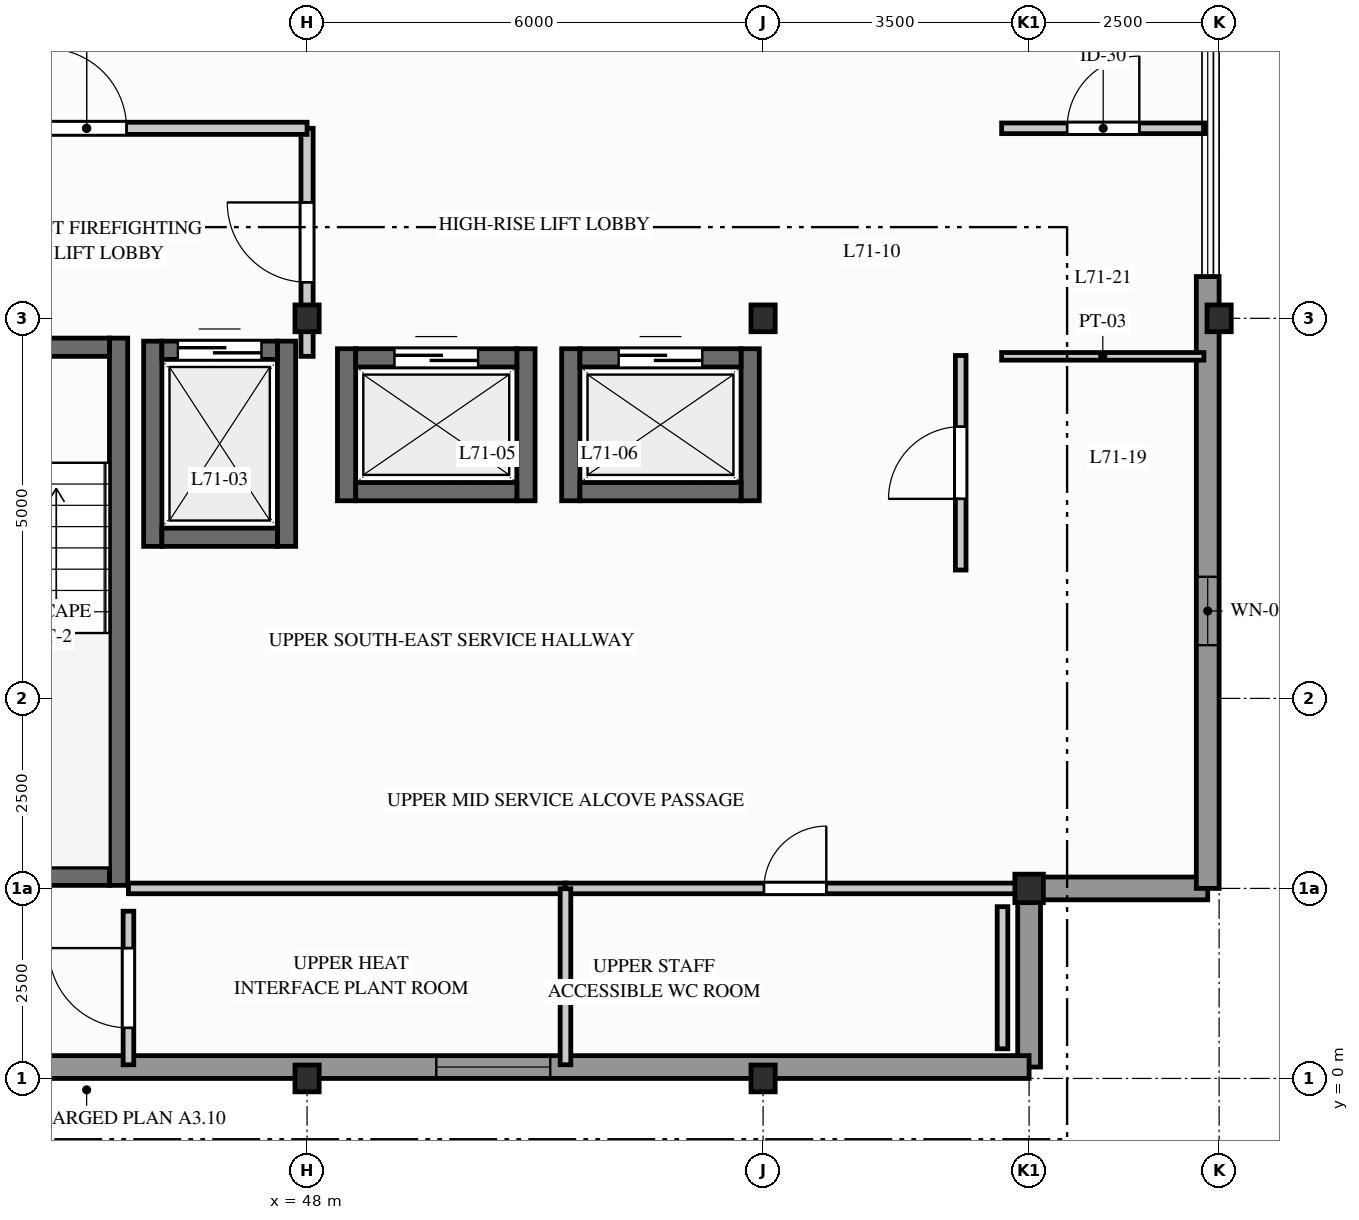
"""IFC4 building model, lengths in metres.
Left out: names, types, materials, properties, quantities, classifications, styles, units other than length and angle.
Written with IfcOpenShell. Run it as: python <this file> out.ifc"""

import sys

from ifc_helpers import new_model, si_unit, direction, frame, frame_2d, origin, origin_2d, place, context, subcontext, project, spatial, rectangle, i_section, extrude, element, fill, save


model = new_model("IFC4")
c1 = context("Model", 3, precision=1e-05, world=origin(), true_north=direction((0.0, 1.0)))
c2 = subcontext(c1, "Body", "Model", "MODEL_VIEW")
j1 = project(units=[si_unit("LENGTHUNIT", "METRE"), si_unit("PLANEANGLEUNIT", "RADIAN")], contexts=[c1])
p1 = place(None, origin())
s1 = spatial("IfcSite", under=j1, at=p1, CompositionType="ELEMENT")
p2 = place(p1, origin())
s2 = spatial("IfcBuilding", under=s1, at=p2, CompositionType="ELEMENT")
p3 = place(p2, frame((0.0, 0.0, 233.5)))
s3 = spatial("IfcBuildingStorey", under=s2, at=p3, CompositionType="ELEMENT", Elevation=233.5)
for number, where, z_axis, x_axis in (
    (1, (48.0, 0.0, 0.0), (0.0, 0.0, 1.0), (1.0, 0.0, 0.0)),
    (2, (48.0, 10.0, 0.0), (0.0, 0.0, 1.0), (1.0, 0.0, 0.0)),
    (3, (54.0, 0.0, 0.0), (0.0, 0.0, 1.0), (1.0, 0.0, 0.0)),
    (4, (54.0, 10.0, 0.0), (0.0, 0.0, 1.0), (1.0, 0.0, 0.0)),
):
    element("IfcColumn", number, at=place(p3, frame(where, z_axis=z_axis, x_axis=x_axis)), inside=s3, PredefinedType="COLUMN", context=c2, shape_type="SweptSolid", body=[
        extrude(i_section(OverallWidth=0.318, OverallDepth=0.353, WebThickness=0.023, FlangeThickness=0.038, FilletRadius=0.015, at=origin_2d()), origin(), (0.0, 0.0, 1.0), 3.1),
    ])
p4 = place(p3, frame((57.5, 2.5, 0.0), z_axis=(0.0, 0.0, 1.0), x_axis=(1.0, 0.0, 0.0)))
e5 = element("IfcColumn", 5, at=p4, inside=s3, PredefinedType="COLUMN", context=c2, shape_type="SweptSolid", body=[
    extrude(i_section(OverallWidth=0.375, OverallDepth=0.375, WebThickness=0.017, FlangeThickness=0.027, FilletRadius=0.015, at=origin_2d()), origin(), (0.0, 0.0, 1.0), 3.1),
])
p5 = place(p3, frame((60.0, 10.0, 0.0), z_axis=(0.0, 0.0, 1.0), x_axis=(1.0, 0.0, 0.0)))
e6 = element("IfcColumn", 6, at=p5, inside=s3, PredefinedType="COLUMN", context=c2, shape_type="SweptSolid", body=[
    extrude(i_section(OverallWidth=0.318, OverallDepth=0.353, WebThickness=0.023, FlangeThickness=0.038, FilletRadius=0.015, at=origin_2d()), origin(), (0.0, 0.0, 1.0), 3.1),
])
for number, where, z_axis, x_axis in (
    (7, (57.5, 0.15, 0.0), (0.0, 0.0, 1.0), (0.0, 1.0, 0.0)),
    (8, (57.5, 2.5, 0.0), (0.0, 0.0, 1.0), (1.0, 0.0, 0.0)),
):
    element("IfcWall", number, at=place(p3, frame(where, z_axis=z_axis, x_axis=x_axis)), inside=s3, PredefinedType="STANDARD", context=c2, shape_type="SweptSolid", body=[
        extrude(rectangle(XDim=2.35, YDim=0.3, at=frame_2d((1.175, 0.0))), origin(), (0.0, 0.0, 1.0), 2.89),
    ])
p6 = place(p3, frame((29.75, 0.15, 0.0), z_axis=(0.0, 0.0, 1.0), x_axis=(1.0, 0.0, 0.0)))
e9 = element("IfcWall", 9, at=p6, inside=s3, PredefinedType="STANDARD", context=c2, shape_type="SweptSolid", body=[
    extrude(rectangle(XDim=27.75, YDim=0.3, at=frame_2d((13.875, 0.0))), origin(), (0.0, 0.0, 1.0), 2.332),
])
p7 = place(p6, frame((2.5, 0.0, 0.712)))
e10 = element("IfcOpeningElement", 10, at=p7, cuts=e9, PredefinedType="OPENING", context=c2, shape_type="SweptSolid", body=[
    extrude(rectangle(XDim=0.8, YDim=1.4, at=frame_2d((0.4, 0.7))), frame((0.0, 0.16, 0.0), z_axis=(0.0, -1.0, 0.0), x_axis=(1.0, 0.0, 0.0)), (0.0, 0.0, 1.0), 0.32),
])
p8 = place(p6, frame((19.95, 0.0, 0.312)))
e11 = element("IfcOpeningElement", 11, at=p8, cuts=e9, PredefinedType="OPENING", context=c2, shape_type="SweptSolid", body=[
    extrude(rectangle(XDim=1.5, YDim=1.8, at=frame_2d((0.75, 0.9))), frame((0.0, 0.16, 0.0), z_axis=(0.0, -1.0, 0.0), x_axis=(1.0, 0.0, 0.0)), (0.0, 0.0, 1.0), 0.32),
])
p9 = place(p3, frame((59.85, 2.5, 0.0), z_axis=(0.0, 0.0, 1.0), x_axis=(0.0, 1.0, 0.0)))
e12 = element("IfcWall", 12, at=p9, inside=s3, PredefinedType="STANDARD", context=c2, shape_type="SweptSolid", body=[
    extrude(rectangle(XDim=8.05, YDim=0.3, at=frame_2d((4.025, 0.0))), origin(), (0.0, 0.0, 1.0), 2.89),
])
p10 = place(p9, frame((3.2, 0.0, 1.2)))
e13 = element("IfcOpeningElement", 13, at=p10, cuts=e12, PredefinedType="OPENING", context=c2, shape_type="SweptSolid", body=[
    extrude(rectangle(XDim=0.9, YDim=0.9, at=frame_2d((0.45, 0.45))), frame((0.0, 0.16, 0.0), z_axis=(0.0, -1.0, 0.0), x_axis=(1.0, 0.0, 0.0)), (0.0, 0.0, 1.0), 0.32),
])
p11 = place(p3, frame((45.52, 2.54, 0.0), z_axis=(0.0, 0.0, 1.0), x_axis=(0.0, 1.0, 0.0)))
e14 = element("IfcWall", 14, at=p11, inside=s3, PredefinedType="SHEAR", context=c2, shape_type="SweptSolid", body=[
    extrude(rectangle(XDim=7.2, YDim=0.24, at=frame_2d((3.6, 0.0))), origin(), (0.0, 0.0, 1.0), 2.89),
])
p12 = place(p3, frame((42.45, 2.66, 0.0), z_axis=(0.0, 0.0, 1.0), x_axis=(1.0, 0.0, 0.0)))
e15 = element("IfcWall", 15, at=p12, inside=s3, PredefinedType="SHEAR", context=c2, shape_type="SweptSolid", body=[
    extrude(rectangle(XDim=2.95, YDim=0.24, at=frame_2d((1.475, 0.0))), origin(), (0.0, 0.0, 1.0), 2.89),
])
p13 = place(p3, frame((45.4, 9.62, 0.0), z_axis=(0.0, 0.0, 1.0), x_axis=(-1.0, 0.0, 0.0)))
e16 = element("IfcWall", 16, at=p13, inside=s3, PredefinedType="SHEAR", context=c2, shape_type="SweptSolid", body=[
    extrude(rectangle(XDim=2.95, YDim=0.24, at=frame_2d((1.475, 0.0))), origin(), (0.0, 0.0, 1.0), 2.89),
])
p14 = place(p13, frame((0.95, 0.0, 0.0)))
e17 = element("IfcOpeningElement", 17, at=p14, cuts=e16, PredefinedType="OPENING", context=c2, shape_type="SweptSolid", body=[
    extrude(rectangle(XDim=1.05, YDim=2.06, at=frame_2d((0.525, 1.03))), frame((0.0, 0.13, 0.0), z_axis=(0.0, -1.0, 0.0), x_axis=(1.0, 0.0, 0.0)), (0.0, 0.0, 1.0), 0.26),
])
for number, where, z_axis, x_axis in (
    (18, (45.97, 7.0, 0.0), (0.0, 0.0, 1.0), (0.0, 1.0, 0.0)),
    (19, (47.73, 7.0, 0.0), (0.0, 0.0, 1.0), (0.0, 1.0, 0.0)),
):
    element("IfcWall", number, at=place(p3, frame(where, z_axis=z_axis, x_axis=x_axis)), inside=s3, PredefinedType="SHEAR", context=c2, shape_type="SweptSolid", body=[
        extrude(rectangle(XDim=2.7, YDim=0.24, at=frame_2d((1.35, 0.0))), origin(), (0.0, 0.0, 1.0), 2.89),
    ])
p15 = place(p3, frame((46.09, 7.12, 0.0), z_axis=(0.0, 0.0, 1.0), x_axis=(1.0, 0.0, 0.0)))
e20 = element("IfcWall", 20, at=p15, inside=s3, PredefinedType="SHEAR", context=c2, shape_type="SweptSolid", body=[
    extrude(rectangle(XDim=1.52, YDim=0.24, at=frame_2d((0.76, 0.0))), origin(), (0.0, 0.0, 1.0), 2.89),
])
p16 = place(p3, frame((46.09, 9.58, 0.0), z_axis=(0.0, 0.0, 1.0), x_axis=(1.0, 0.0, 0.0)))
e21 = element("IfcWall", 21, at=p16, inside=s3, PredefinedType="SHEAR", context=c2, shape_type="SweptSolid", body=[
    extrude(rectangle(XDim=1.52, YDim=0.24, at=frame_2d((0.76, 0.0))), origin(), (0.0, 0.0, 1.0), 2.89),
])
p17 = place(p16, frame((0.21, 0.0, 0.0)))
e22 = element("IfcOpeningElement", 22, at=p17, cuts=e21, PredefinedType="OPENING", context=c2, shape_type="SweptSolid", body=[
    extrude(rectangle(XDim=1.1, YDim=2.06, at=frame_2d((0.55, 1.03))), frame((0.0, 0.13, 0.0), z_axis=(0.0, -1.0, 0.0), x_axis=(1.0, 0.0, 0.0)), (0.0, 0.0, 1.0), 0.26),
])
for number, where, z_axis, x_axis in (
    (23, (48.52, 7.6, 0.0), (0.0, 0.0, 1.0), (0.0, 1.0, 0.0)),
    (24, (50.88, 7.6, 0.0), (0.0, 0.0, 1.0), (0.0, 1.0, 0.0)),
):
    element("IfcWall", number, at=place(p3, frame(where, z_axis=z_axis, x_axis=x_axis)), inside=s3, PredefinedType="SHEAR", context=c2, shape_type="SweptSolid", body=[
        extrude(rectangle(XDim=2.0, YDim=0.24, at=frame_2d((1.0, 0.0))), origin(), (0.0, 0.0, 1.0), 2.89),
    ])
p18 = place(p3, frame((48.64, 7.72, 0.0), z_axis=(0.0, 0.0, 1.0), x_axis=(1.0, 0.0, 0.0)))
e25 = element("IfcWall", 25, at=p18, inside=s3, PredefinedType="SHEAR", context=c2, shape_type="SweptSolid", body=[
    extrude(rectangle(XDim=2.12, YDim=0.24, at=frame_2d((1.06, 0.0))), origin(), (0.0, 0.0, 1.0), 2.89),
])
p19 = place(p3, frame((48.64, 9.48, 0.0), z_axis=(0.0, 0.0, 1.0), x_axis=(1.0, 0.0, 0.0)))
e26 = element("IfcWall", 26, at=p19, inside=s3, PredefinedType="SHEAR", context=c2, shape_type="SweptSolid", body=[
    extrude(rectangle(XDim=2.12, YDim=0.24, at=frame_2d((1.06, 0.0))), origin(), (0.0, 0.0, 1.0), 2.89),
])
p20 = place(p19, frame((0.51, 0.0, 0.0)))
e27 = element("IfcOpeningElement", 27, at=p20, cuts=e26, PredefinedType="OPENING", context=c2, shape_type="SweptSolid", body=[
    extrude(rectangle(XDim=1.1, YDim=2.06, at=frame_2d((0.55, 1.03))), frame((0.0, 0.13, 0.0), z_axis=(0.0, -1.0, 0.0), x_axis=(1.0, 0.0, 0.0)), (0.0, 0.0, 1.0), 0.26),
])
for number, where, z_axis, x_axis in (
    (28, (51.47, 7.6, 0.0), (0.0, 0.0, 1.0), (0.0, 1.0, 0.0)),
    (29, (53.83, 7.6, 0.0), (0.0, 0.0, 1.0), (0.0, 1.0, 0.0)),
):
    element("IfcWall", number, at=place(p3, frame(where, z_axis=z_axis, x_axis=x_axis)), inside=s3, PredefinedType="SHEAR", context=c2, shape_type="SweptSolid", body=[
        extrude(rectangle(XDim=2.0, YDim=0.24, at=frame_2d((1.0, 0.0))), origin(), (0.0, 0.0, 1.0), 2.89),
    ])
p21 = place(p3, frame((51.59, 7.72, 0.0), z_axis=(0.0, 0.0, 1.0), x_axis=(1.0, 0.0, 0.0)))
e30 = element("IfcWall", 30, at=p21, inside=s3, PredefinedType="SHEAR", context=c2, shape_type="SweptSolid", body=[
    extrude(rectangle(XDim=2.12, YDim=0.24, at=frame_2d((1.06, 0.0))), origin(), (0.0, 0.0, 1.0), 2.89),
])
p22 = place(p3, frame((51.59, 9.48, 0.0), z_axis=(0.0, 0.0, 1.0), x_axis=(1.0, 0.0, 0.0)))
e31 = element("IfcWall", 31, at=p22, inside=s3, PredefinedType="SHEAR", context=c2, shape_type="SweptSolid", body=[
    extrude(rectangle(XDim=2.12, YDim=0.24, at=frame_2d((1.06, 0.0))), origin(), (0.0, 0.0, 1.0), 2.89),
])
p23 = place(p22, frame((0.51, 0.0, 0.0)))
e32 = element("IfcOpeningElement", 32, at=p23, cuts=e31, PredefinedType="OPENING", context=c2, shape_type="SweptSolid", body=[
    extrude(rectangle(XDim=1.1, YDim=2.06, at=frame_2d((0.55, 1.03))), frame((0.0, 0.13, 0.0), z_axis=(0.0, -1.0, 0.0), x_axis=(1.0, 0.0, 0.0)), (0.0, 0.0, 1.0), 0.26),
])
p24 = place(p3, frame((45.65, 0.18, 0.0), z_axis=(0.0, 0.0, 1.0), x_axis=(0.0, 1.0, 0.0)))
e33 = element("IfcWall", 33, at=p24, inside=s3, PredefinedType="PARTITIONING", context=c2, shape_type="SweptSolid", body=[
    extrude(rectangle(XDim=2.02, YDim=0.14, at=frame_2d((1.01, 0.0))), origin(), (0.0, 0.0, 1.0), 2.89),
])
p25 = place(p24, frame((0.485, 0.0, 0.0)))
e34 = element("IfcOpeningElement", 34, at=p25, cuts=e33, PredefinedType="OPENING", context=c2, shape_type="SweptSolid", body=[
    extrude(rectangle(XDim=1.05, YDim=2.06, at=frame_2d((0.525, 1.03))), frame((0.0, 0.08, 0.0), z_axis=(0.0, -1.0, 0.0), x_axis=(1.0, 0.0, 0.0)), (0.0, 0.0, 1.0), 0.16),
])
p26 = place(p3, frame((56.6, 6.689, 0.0), z_axis=(0.0, 0.0, 1.0), x_axis=(0.0, 1.0, 0.0)))
e35 = element("IfcWall", 35, at=p26, inside=s3, PredefinedType="PARTITIONING", context=c2, shape_type="SweptSolid", body=[
    extrude(rectangle(XDim=2.823, YDim=0.14, at=frame_2d((1.411, 0.0))), origin(), (0.0, 0.0, 1.0), 2.89),
])
p27 = place(p26, frame((0.936, 0.0, 0.0)))
e36 = element("IfcOpeningElement", 36, at=p27, cuts=e35, PredefinedType="OPENING", context=c2, shape_type="SweptSolid", body=[
    extrude(rectangle(XDim=0.95, YDim=2.05, at=frame_2d((0.475, 1.025))), frame((0.0, 0.08, 0.0), z_axis=(0.0, -1.0, 0.0), x_axis=(1.0, 0.0, 0.0)), (0.0, 0.0, 1.0), 0.16),
])
p28 = place(p3, frame((45.65, 2.5, 0.0), z_axis=(0.0, 0.0, 1.0), x_axis=(1.0, 0.0, 0.0)))
e37 = element("IfcWall", 37, at=p28, inside=s3, PredefinedType="PARTITIONING", context=c2, shape_type="SweptSolid", body=[
    extrude(rectangle(XDim=5.761, YDim=0.14, at=frame_2d((2.881, 0.0))), origin(), (0.0, 0.0, 1.0), 2.325),
])
p29 = place(p3, frame((51.393, 2.5, 0.0), z_axis=(0.0, 0.0, 1.0), x_axis=(1.0, 0.0, 0.0)))
e38 = element("IfcWall", 38, at=p29, inside=s3, PredefinedType="PARTITIONING", context=c2, shape_type="SweptSolid", body=[
    extrude(rectangle(XDim=6.057, YDim=0.14, at=frame_2d((3.029, 0.0))), origin(), (0.0, 0.0, 1.0), 2.325),
])
p30 = place(p29, frame((2.619, 0.0, 0.0)))
e39 = element("IfcOpeningElement", 39, at=p30, cuts=e38, PredefinedType="OPENING", context=c2, shape_type="SweptSolid", body=[
    extrude(rectangle(XDim=0.82, YDim=2.02, at=frame_2d((0.41, 1.01))), frame((0.0, 0.08, 0.0), z_axis=(0.0, -1.0, 0.0), x_axis=(1.0, 0.0, 0.0)), (0.0, 0.0, 1.0), 0.16),
])
p31 = place(p3, frame((51.4, 0.18, 0.0), z_axis=(0.0, 0.0, 1.0), x_axis=(0.0, 1.0, 0.0)))
e40 = element("IfcWall", 40, at=p31, inside=s3, PredefinedType="PARTITIONING", context=c2, shape_type="SweptSolid", body=[
    extrude(rectangle(XDim=2.316, YDim=0.14, at=frame_2d((1.158, 0.0))), origin(), (0.0, 0.0, 1.0), 2.89),
])
p32 = place(p3, frame((48.0, 9.5, 0.0), z_axis=(0.0, 0.0, 1.0), x_axis=(0.0, 1.0, 0.0)))
e41 = element("IfcWall", 41, at=p32, inside=s3, PredefinedType="PARTITIONING", context=c2, shape_type="SweptSolid", body=[
    extrude(rectangle(XDim=3.0, YDim=0.16, at=frame_2d((1.5, 0.0))), origin(), (0.0, 0.0, 1.0), 2.325),
])
p33 = place(p32, frame((0.975, 0.0, 0.0)))
e42 = element("IfcOpeningElement", 42, at=p33, cuts=e41, PredefinedType="OPENING", context=c2, shape_type="SweptSolid", body=[
    extrude(rectangle(XDim=1.05, YDim=2.06, at=frame_2d((0.525, 1.03))), frame((0.0, 0.09, 0.0), z_axis=(0.0, -1.0, 0.0), x_axis=(1.0, 0.0, 0.0)), (0.0, 0.0, 1.0), 0.18),
])
p34 = place(p3, frame((42.2, 12.5, 0.0), z_axis=(0.0, 0.0, 1.0), x_axis=(1.0, 0.0, 0.0)))
e43 = element("IfcWall", 43, at=p34, inside=s3, PredefinedType="PARTITIONING", context=c2, shape_type="SweptSolid", body=[
    extrude(rectangle(XDim=5.8, YDim=0.16, at=frame_2d((2.9, 0.0))), origin(), (0.0, 0.0, 1.0), 2.325),
])
p35 = place(p34, frame((2.375, 0.0, 0.0)))
e44 = element("IfcOpeningElement", 44, at=p35, cuts=e43, PredefinedType="OPENING", context=c2, shape_type="SweptSolid", body=[
    extrude(rectangle(XDim=1.05, YDim=2.06, at=frame_2d((0.525, 1.03))), frame((0.0, 0.09, 0.0), z_axis=(0.0, -1.0, 0.0), x_axis=(1.0, 0.0, 0.0)), (0.0, 0.0, 1.0), 0.18),
])
p36 = place(p3, frame((57.139, 9.5, 0.0), z_axis=(0.0, 0.0, 1.0), x_axis=(1.0, 0.0, 0.0)))
e45 = element("IfcWall", 45, at=p36, inside=s3, PredefinedType="PARTITIONING", context=c2, shape_type="SweptSolid", body=[
    extrude(rectangle(XDim=2.661, YDim=0.1, at=frame_2d((1.331, 0.0))), origin(), (0.0, 0.0, 1.0), 2.89),
])
p37 = place(p3, frame((57.139, 12.5, 0.0), z_axis=(0.0, 0.0, 1.0), x_axis=(1.0, 0.0, 0.0)))
e46 = element("IfcWall", 46, at=p37, inside=s3, PredefinedType="PARTITIONING", context=c2, shape_type="SweptSolid", body=[
    extrude(rectangle(XDim=2.673, YDim=0.14, at=frame_2d((1.336, 0.0))), origin(), (0.0, 0.0, 1.0), 2.89),
])
p38 = place(p37, frame((0.861, 0.0, 0.0)))
e47 = element("IfcOpeningElement", 47, at=p38, cuts=e46, PredefinedType="OPENING", context=c2, shape_type="SweptSolid", body=[
    extrude(rectangle(XDim=0.95, YDim=2.05, at=frame_2d((0.475, 1.025))), frame((0.0, 0.08, 0.0), z_axis=(0.0, -1.0, 0.0), x_axis=(1.0, 0.0, 0.0)), (0.0, 0.0, 1.0), 0.16),
])
p39 = place(p3, frame((57.15, 0.39, 0.0), z_axis=(0.0, 0.0, 1.0), x_axis=(0.0, 1.0, 0.0)))
e48 = element("IfcWall", 48, at=p39, inside=s3, PredefinedType="PARTITIONING", context=c2, shape_type="SweptSolid", body=[
    extrude(rectangle(XDim=1.87, YDim=0.14, at=frame_2d((0.935, 0.0))), origin(), (0.0, 0.0, 1.0), 2.89),
])
p40 = place(p8, origin())
e49 = element("IfcWindow", 49, at=p40, inside=s3, PartitioningType="SINGLE_PANEL", PredefinedType="WINDOW", context=c2, shape_type="SweptSolid", body=[
    extrude(rectangle(XDim=1.5, YDim=1.8, at=frame_2d((0.75, 0.9))), frame((0.0, 0.03, 0.0), z_axis=(0.0, -1.0, 0.0), x_axis=(1.0, 0.0, 0.0)), (0.0, 0.0, 1.0), 0.06),
])
fill(e11, e49)
p41 = place(p10, origin())
e50 = element("IfcWindow", 50, at=p41, inside=s3, PartitioningType="SINGLE_PANEL", PredefinedType="WINDOW", context=c2, shape_type="SweptSolid", body=[
    extrude(rectangle(XDim=0.9, YDim=0.9, at=frame_2d((0.45, 0.45))), frame((0.0, 0.03, 0.0), z_axis=(0.0, -1.0, 0.0), x_axis=(1.0, 0.0, 0.0)), (0.0, 0.0, 1.0), 0.06),
])
fill(e13, e50)
p42 = place(p17, origin())
e51 = element("IfcDoor", 51, at=p42, inside=s3, OperationType="SLIDING_TO_RIGHT", PredefinedType="DOOR", context=c2, shape_type="SweptSolid", body=[
    extrude(rectangle(XDim=1.1, YDim=2.06, at=frame_2d((0.55, 1.03))), frame((0.0, 0.025, 0.0), z_axis=(0.0, -1.0, 0.0), x_axis=(1.0, 0.0, 0.0)), (0.0, 0.0, 1.0), 0.05),
])
fill(e22, e51)
p43 = place(p20, origin())
e52 = element("IfcDoor", 52, at=p43, inside=s3, OperationType="SLIDING_TO_RIGHT", PredefinedType="DOOR", context=c2, shape_type="SweptSolid", body=[
    extrude(rectangle(XDim=1.1, YDim=2.06, at=frame_2d((0.55, 1.03))), frame((0.0, 0.025, 0.0), z_axis=(0.0, -1.0, 0.0), x_axis=(1.0, 0.0, 0.0)), (0.0, 0.0, 1.0), 0.05),
])
fill(e27, e52)
p44 = place(p23, origin())
e53 = element("IfcDoor", 53, at=p44, inside=s3, OperationType="SLIDING_TO_LEFT", PredefinedType="DOOR", context=c2, shape_type="SweptSolid", body=[
    extrude(rectangle(XDim=1.1, YDim=2.06, at=frame_2d((0.55, 1.03))), frame((0.0, 0.025, 0.0), z_axis=(0.0, -1.0, 0.0), x_axis=(1.0, 0.0, 0.0)), (0.0, 0.0, 1.0), 0.05),
])
fill(e32, e53)
p45 = place(p25, origin())
e54 = element("IfcDoor", 54, at=p45, inside=s3, OperationType="SINGLE_SWING_RIGHT", PredefinedType="DOOR", context=c2, shape_type="SweptSolid", body=[
    extrude(rectangle(XDim=1.05, YDim=2.06, at=frame_2d((0.525, 1.03))), frame((0.0, 0.025, 0.0), z_axis=(0.0, -1.0, 0.0), x_axis=(1.0, 0.0, 0.0)), (0.0, 0.0, 1.0), 0.05),
])
fill(e34, e54)
p46 = place(p27, origin())
e55 = element("IfcDoor", 55, at=p46, inside=s3, OperationType="SINGLE_SWING_LEFT", PredefinedType="DOOR", context=c2, shape_type="SweptSolid", body=[
    extrude(rectangle(XDim=0.95, YDim=2.05, at=frame_2d((0.475, 1.025))), frame((0.0, 0.025, 0.0), z_axis=(0.0, -1.0, 0.0), x_axis=(1.0, 0.0, 0.0)), (0.0, 0.0, 1.0), 0.05),
])
fill(e36, e55)
p47 = place(p30, origin())
e56 = element("IfcDoor", 56, at=p47, inside=s3, OperationType="SINGLE_SWING_RIGHT", PredefinedType="DOOR", context=c2, shape_type="SweptSolid", body=[
    extrude(rectangle(XDim=0.82, YDim=2.02, at=frame_2d((0.41, 1.01))), frame((0.0, 0.025, 0.0), z_axis=(0.0, -1.0, 0.0), x_axis=(1.0, 0.0, 0.0)), (0.0, 0.0, 1.0), 0.05),
])
fill(e39, e56)
p48 = place(p33, origin())
e57 = element("IfcDoor", 57, at=p48, inside=s3, OperationType="SINGLE_SWING_RIGHT", PredefinedType="DOOR", context=c2, shape_type="SweptSolid", body=[
    extrude(rectangle(XDim=1.05, YDim=2.06, at=frame_2d((0.525, 1.03))), frame((0.0, 0.025, 0.0), z_axis=(0.0, -1.0, 0.0), x_axis=(1.0, 0.0, 0.0)), (0.0, 0.0, 1.0), 0.05),
])
fill(e42, e57)
p49 = place(p35, origin())
e58 = element("IfcDoor", 58, at=p49, inside=s3, OperationType="SINGLE_SWING_LEFT", PredefinedType="DOOR", context=c2, shape_type="SweptSolid", body=[
    extrude(rectangle(XDim=1.05, YDim=2.06, at=frame_2d((0.525, 1.03))), frame((0.0, 0.025, 0.0), z_axis=(0.0, -1.0, 0.0), x_axis=(1.0, 0.0, 0.0)), (0.0, 0.0, 1.0), 0.05),
])
fill(e44, e58)
p50 = place(p38, origin())
e59 = element("IfcDoor", 59, at=p50, inside=s3, OperationType="SINGLE_SWING_RIGHT", PredefinedType="DOOR", context=c2, shape_type="SweptSolid", body=[
    extrude(rectangle(XDim=0.95, YDim=2.05, at=frame_2d((0.475, 1.025))), frame((0.0, 0.025, 0.0), z_axis=(0.0, -1.0, 0.0), x_axis=(1.0, 0.0, 0.0)), (0.0, 0.0, 1.0), 0.05),
])
fill(e47, e59)
save(model, sys.argv[1])
